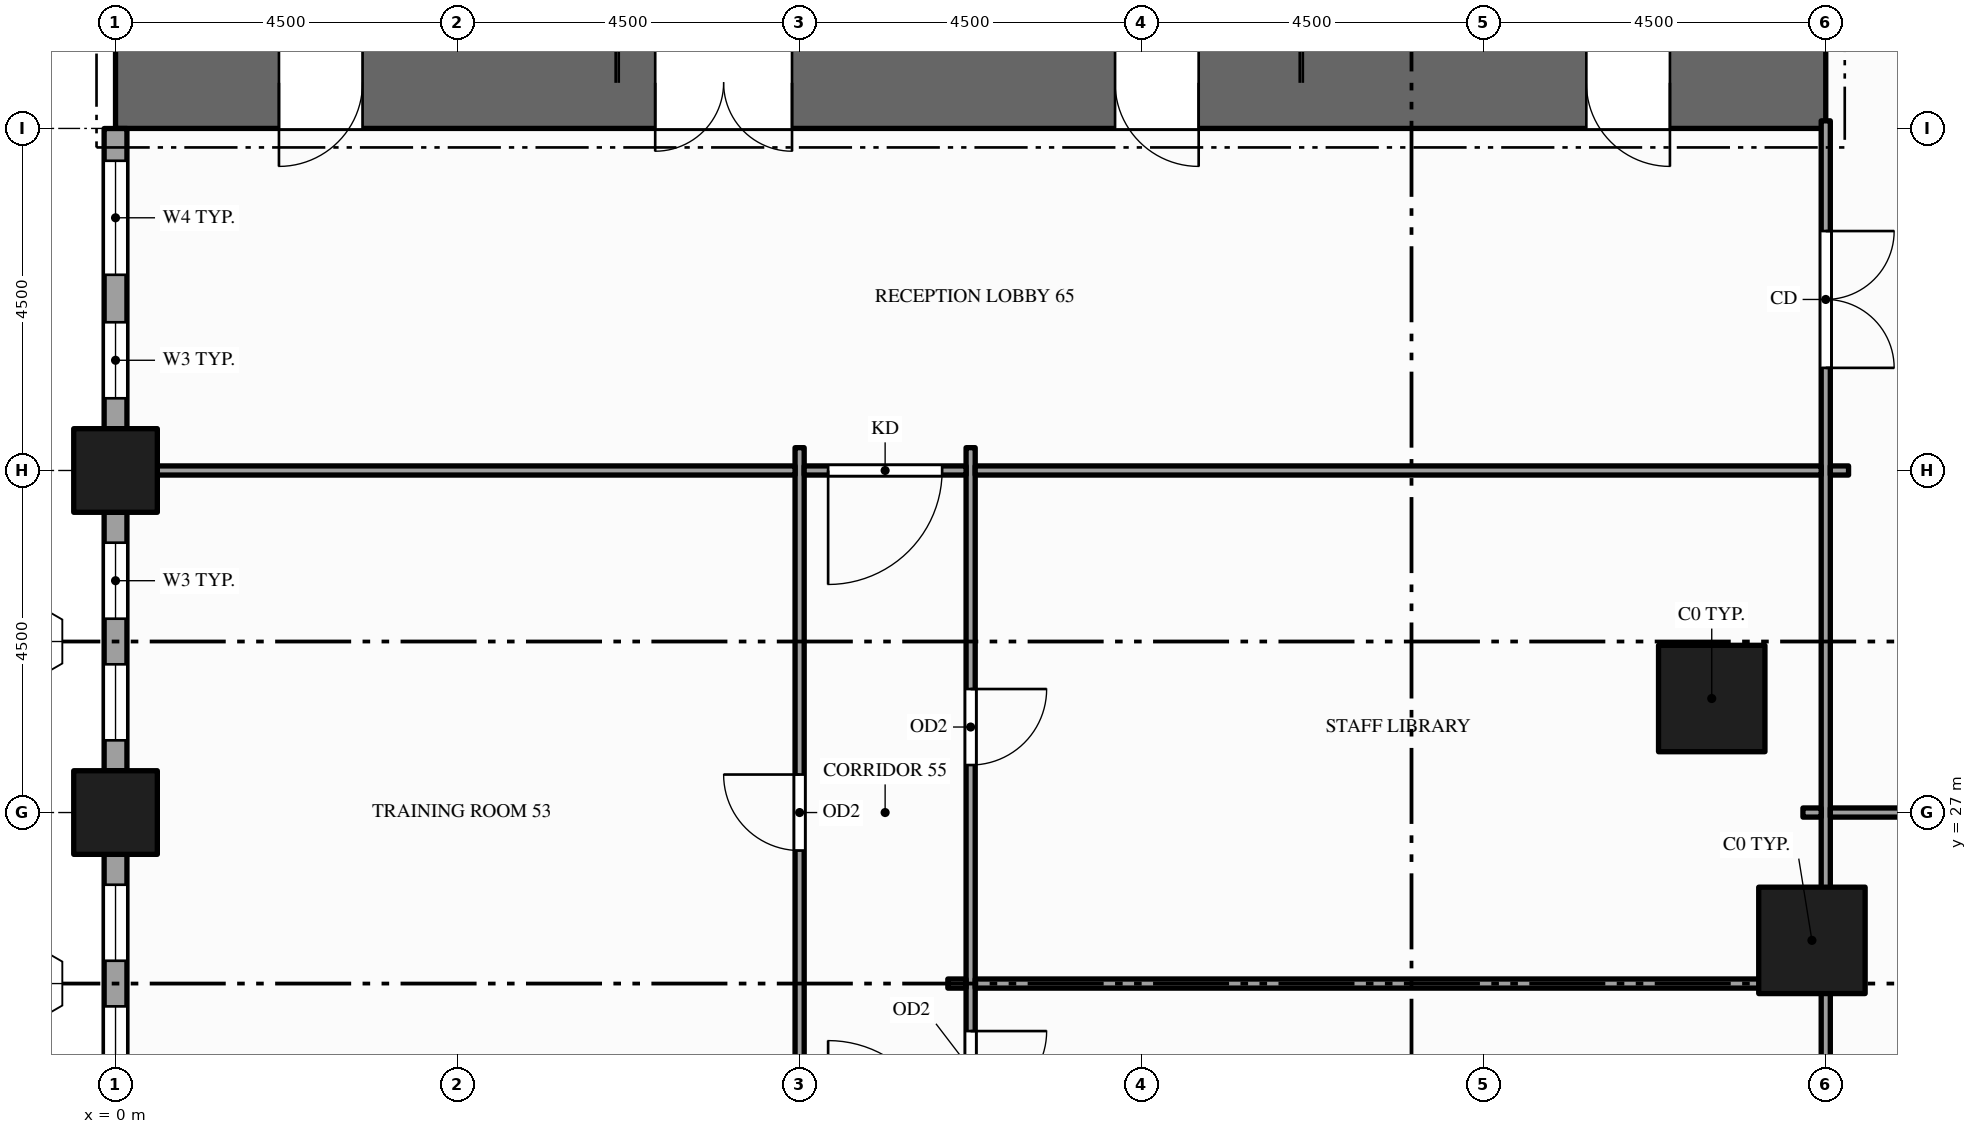
"""IFC4 building model, lengths in metres.
Left out: names, types, materials, properties, quantities, classifications, styles, units other than length and angle.
Written with IfcOpenShell. Run it as: python <this file> out.ifc"""

import sys

from ifc_helpers import new_model, si_unit, direction, frame, frame_2d, origin, origin_2d, place, context, subcontext, project, spatial, rectangle, hollow_rectangle, extrude, element, fill, save


model = new_model("IFC4")
c1 = context("Model", 3, precision=1e-05, world=origin(), true_north=direction((0.0, 1.0)))
c2 = subcontext(c1, "Body", "Model", "MODEL_VIEW")
j1 = project(units=[si_unit("LENGTHUNIT", "METRE"), si_unit("PLANEANGLEUNIT", "RADIAN")], contexts=[c1])
p1 = place(None, origin())
s1 = spatial("IfcSite", under=j1, at=p1, CompositionType="ELEMENT")
p2 = place(p1, origin())
s2 = spatial("IfcBuilding", under=s1, at=p2, CompositionType="ELEMENT")
p3 = place(p2, frame((0.0, 0.0, 19.0)))
s3 = spatial("IfcBuildingStorey", under=s2, at=p3, CompositionType="ELEMENT", Elevation=19.0)
p4 = place(p3, frame((0.0, 36.6, -0.15), z_axis=(0.0, 0.0, 1.0), x_axis=(1.0, 0.0, 0.0)))
e1 = element("IfcWall", 1, at=p4, inside=s3, PredefinedType="SHEAR", context=c2, shape_type="SweptSolid", body=[
    extrude(rectangle(XDim=22.5, YDim=1.2, at=frame_2d((11.25, 0.0))), origin(), (0.0, 0.0, 1.0), 5.0),
])
p5 = place(p4, frame((7.1, 0.0, 0.15)))
e2 = element("IfcOpeningElement", 2, at=p5, cuts=e1, PredefinedType="OPENING", context=c2, shape_type="SweptSolid", body=[
    extrude(rectangle(XDim=1.8, YDim=2.1, at=frame_2d((0.9, 1.05))), frame((0.0, 0.61, 0.0), z_axis=(0.0, -1.0, 0.0), x_axis=(1.0, 0.0, 0.0)), (0.0, 0.0, 1.0), 1.22),
])
p6 = place(p4, frame((13.15, 0.0, 0.15)))
e3 = element("IfcOpeningElement", 3, at=p6, cuts=e1, PredefinedType="OPENING", context=c2, shape_type="SweptSolid", body=[
    extrude(rectangle(XDim=1.1, YDim=2.1, at=frame_2d((0.55, 1.05))), frame((0.0, 0.61, 0.0), z_axis=(0.0, -1.0, 0.0), x_axis=(1.0, 0.0, 0.0)), (0.0, 0.0, 1.0), 1.22),
])
p7 = place(p4, frame((2.15, 0.0, 0.15)))
e4 = element("IfcOpeningElement", 4, at=p7, cuts=e1, PredefinedType="OPENING", context=c2, shape_type="SweptSolid", body=[
    extrude(rectangle(XDim=1.1, YDim=2.1, at=frame_2d((0.55, 1.05))), frame((0.0, 0.61, 0.0), z_axis=(0.0, -1.0, 0.0), x_axis=(1.0, 0.0, 0.0)), (0.0, 0.0, 1.0), 1.22),
])
p8 = place(p4, frame((19.35, 0.0, 0.15)))
e5 = element("IfcOpeningElement", 5, at=p8, cuts=e1, PredefinedType="OPENING", context=c2, shape_type="SweptSolid", body=[
    extrude(rectangle(XDim=1.1, YDim=2.1, at=frame_2d((0.55, 1.05))), frame((0.0, 0.61, 0.0), z_axis=(0.0, -1.0, 0.0), x_axis=(1.0, 0.0, 0.0)), (0.0, 0.0, 1.0), 1.22),
])
for number, where, z_axis, x_axis in (
    (6, (0.0, 27.0, -0.25), (0.0, 0.0, 1.0), (1.0, 0.0, 0.0)),
    (7, (0.0, 31.5, -0.25), (0.0, 0.0, 1.0), (1.0, 0.0, 0.0)),
):
    element("IfcColumn", number, at=place(p3, frame(where, z_axis=z_axis, x_axis=x_axis)), inside=s3, PredefinedType="COLUMN", context=c2, shape_type="SweptSolid", body=[
        extrude(hollow_rectangle(XDim=1.1, YDim=1.1, WallThickness=0.06, at=origin_2d()), origin(), (0.0, 0.0, 1.0), 5.0),
    ])
for number, where, z_axis, x_axis in (
    (8, (21.0, 28.5, -0.25), (0.0, 0.0, 1.0), (1.0, 0.0, 0.0)),
    (9, (22.318, 25.318, -0.25), (0.0, 0.0, 1.0), (1.0, 0.0, 0.0)),
):
    element("IfcColumn", number, at=place(p3, frame(where, z_axis=z_axis, x_axis=x_axis)), inside=s3, PredefinedType="COLUMN", context=c2, shape_type="SweptSolid", body=[
        extrude(hollow_rectangle(XDim=1.4, YDim=1.4, WallThickness=0.08, at=origin_2d()), origin(), (0.0, 0.0, 1.0), 5.0),
    ])
p9 = place(p3, frame((0.0, 35.999, 0.0), z_axis=(0.0, 0.0, 1.0), x_axis=(0.0, -1.0, 0.0)))
e10 = element("IfcWall", 10, at=p9, inside=s3, PredefinedType="STANDARD", context=c2, shape_type="SweptSolid", body=[
    extrude(rectangle(XDim=3.949, YDim=0.3, at=frame_2d((1.975, 0.0))), origin(), (0.0, 0.0, 1.0), 4.036),
])
p10 = place(p9, frame((0.425, 0.0, 0.9)))
e11 = element("IfcOpeningElement", 11, at=p10, cuts=e10, PredefinedType="OPENING", context=c2, shape_type="SweptSolid", body=[
    extrude(rectangle(XDim=1.5, YDim=2.75, at=frame_2d((0.75, 1.375))), frame((0.0, 0.16, 0.0), z_axis=(0.0, -1.0, 0.0), x_axis=(1.0, 0.0, 0.0)), (0.0, 0.0, 1.0), 0.32),
])
p11 = place(p9, frame((2.549, 0.0, 0.9)))
e12 = element("IfcOpeningElement", 12, at=p11, cuts=e10, PredefinedType="OPENING", context=c2, shape_type="SweptSolid", body=[
    extrude(rectangle(XDim=1.0, YDim=2.75, at=frame_2d((0.5, 1.375))), frame((0.0, 0.16, 0.0), z_axis=(0.0, -1.0, 0.0), x_axis=(1.0, 0.0, 0.0)), (0.0, 0.0, 1.0), 0.32),
])
p12 = place(p3, frame((0.0, 30.95, 0.0), z_axis=(0.0, 0.0, 1.0), x_axis=(0.0, -1.0, 0.0)))
e13 = element("IfcWall", 13, at=p12, inside=s3, PredefinedType="STANDARD", context=c2, shape_type="SweptSolid", body=[
    extrude(rectangle(XDim=3.4, YDim=0.3, at=frame_2d((1.7, 0.0))), origin(), (0.0, 0.0, 1.0), 4.036),
])
p13 = place(p12, frame((0.4, 0.0, 0.9)))
e14 = element("IfcOpeningElement", 14, at=p13, cuts=e13, PredefinedType="OPENING", context=c2, shape_type="SweptSolid", body=[
    extrude(rectangle(XDim=1.0, YDim=2.75, at=frame_2d((0.5, 1.375))), frame((0.0, 0.16, 0.0), z_axis=(0.0, -1.0, 0.0), x_axis=(1.0, 0.0, 0.0)), (0.0, 0.0, 1.0), 0.32),
])
p14 = place(p12, frame((2.0, 0.0, 0.9)))
e15 = element("IfcOpeningElement", 15, at=p14, cuts=e13, PredefinedType="OPENING", context=c2, shape_type="SweptSolid", body=[
    extrude(rectangle(XDim=1.0, YDim=2.75, at=frame_2d((0.5, 1.375))), frame((0.0, 0.16, 0.0), z_axis=(0.0, -1.0, 0.0), x_axis=(1.0, 0.0, 0.0)), (0.0, 0.0, 1.0), 0.32),
])
p15 = place(p3, frame((0.0, 26.45, 0.0), z_axis=(0.0, 0.0, 1.0), x_axis=(0.0, -1.0, 0.0)))
e16 = element("IfcWall", 16, at=p15, inside=s3, PredefinedType="STANDARD", context=c2, shape_type="SweptSolid", body=[
    extrude(rectangle(XDim=3.4, YDim=0.3, at=frame_2d((1.7, 0.0))), origin(), (0.0, 0.0, 1.0), 4.036),
])
p16 = place(p15, frame((0.4, 0.0, 0.9)))
e17 = element("IfcOpeningElement", 17, at=p16, cuts=e16, PredefinedType="OPENING", context=c2, shape_type="SweptSolid", body=[
    extrude(rectangle(XDim=1.0, YDim=2.75, at=frame_2d((0.5, 1.375))), frame((0.0, 0.16, 0.0), z_axis=(0.0, -1.0, 0.0), x_axis=(1.0, 0.0, 0.0)), (0.0, 0.0, 1.0), 0.32),
])
p17 = place(p15, frame((2.0, 0.0, 0.9)))
e18 = element("IfcOpeningElement", 18, at=p17, cuts=e16, PredefinedType="OPENING", context=c2, shape_type="SweptSolid", body=[
    extrude(rectangle(XDim=1.0, YDim=2.75, at=frame_2d((0.5, 1.375))), frame((0.0, 0.16, 0.0), z_axis=(0.0, -1.0, 0.0), x_axis=(1.0, 0.0, 0.0)), (0.0, 0.0, 1.0), 0.32),
])
p18 = place(p3, frame((9.0, 10.95, 0.0), z_axis=(0.0, 0.0, 1.0), x_axis=(0.0, 1.0, 0.0)))
e19 = element("IfcWall", 19, at=p18, inside=s3, PredefinedType="PARTITIONING", context=c2, shape_type="SweptSolid", body=[
    extrude(rectangle(XDim=20.85, YDim=0.12, at=frame_2d((10.425, 0.0))), origin(), (0.0, 0.0, 1.0), 3.5),
])
p19 = place(p18, frame((15.55, 0.0, 0.0)))
e20 = element("IfcOpeningElement", 20, at=p19, cuts=e19, PredefinedType="OPENING", context=c2, shape_type="SweptSolid", body=[
    extrude(rectangle(XDim=1.0, YDim=2.1, at=frame_2d((0.5, 1.05))), frame((0.0, 0.07, 0.0), z_axis=(0.0, -1.0, 0.0), x_axis=(1.0, 0.0, 0.0)), (0.0, 0.0, 1.0), 0.14),
])
p20 = place(p3, frame((11.25, 10.95, 0.0), z_axis=(0.0, 0.0, 1.0), x_axis=(0.0, 1.0, 0.0)))
e21 = element("IfcWall", 21, at=p20, inside=s3, PredefinedType="PARTITIONING", context=c2, shape_type="SweptSolid", body=[
    extrude(rectangle(XDim=20.85, YDim=0.12, at=frame_2d((10.425, 0.0))), origin(), (0.0, 0.0, 1.0), 3.5),
])
p21 = place(p20, frame((5.425, 0.0, 0.0)))
e22 = element("IfcOpeningElement", 22, at=p21, cuts=e21, PredefinedType="OPENING", context=c2, shape_type="SweptSolid", body=[
    extrude(rectangle(XDim=1.0, YDim=2.1, at=frame_2d((0.5, 1.05))), frame((0.0, 0.07, 0.0), z_axis=(0.0, -1.0, 0.0), x_axis=(1.0, 0.0, 0.0)), (0.0, 0.0, 1.0), 0.14),
])
p22 = place(p20, frame((12.175, 0.0, 0.0)))
e23 = element("IfcOpeningElement", 23, at=p22, cuts=e21, PredefinedType="OPENING", context=c2, shape_type="SweptSolid", body=[
    extrude(rectangle(XDim=1.0, YDim=2.1, at=frame_2d((0.5, 1.05))), frame((0.0, 0.07, 0.0), z_axis=(0.0, -1.0, 0.0), x_axis=(1.0, 0.0, 0.0)), (0.0, 0.0, 1.0), 0.14),
])
p23 = place(p20, frame((16.675, 0.0, 0.0)))
e24 = element("IfcOpeningElement", 24, at=p23, cuts=e21, PredefinedType="OPENING", context=c2, shape_type="SweptSolid", body=[
    extrude(rectangle(XDim=1.0, YDim=2.1, at=frame_2d((0.5, 1.05))), frame((0.0, 0.07, 0.0), z_axis=(0.0, -1.0, 0.0), x_axis=(1.0, 0.0, 0.0)), (0.0, 0.0, 1.0), 0.14),
])
p24 = place(p3, frame((22.5, 0.15, 0.0), z_axis=(0.0, 0.0, 1.0), x_axis=(0.0, 1.0, 0.0)))
e25 = element("IfcWall", 25, at=p24, inside=s3, PredefinedType="PARTITIONING", context=c2, shape_type="SweptSolid", body=[
    extrude(rectangle(XDim=35.95, YDim=0.12, at=frame_2d((17.975, 0.0))), origin(), (0.0, 0.0, 1.0), 3.759),
])
p25 = place(p24, frame((9.225, 0.0, 0.0)))
e26 = element("IfcOpeningElement", 26, at=p25, cuts=e25, PredefinedType="OPENING", context=c2, shape_type="SweptSolid", body=[
    extrude(rectangle(XDim=1.5, YDim=2.1, at=frame_2d((0.75, 1.05))), frame((0.0, 0.07, 0.0), z_axis=(0.0, -1.0, 0.0), x_axis=(1.0, 0.0, 0.0)), (0.0, 0.0, 1.0), 0.14),
])
p26 = place(p24, frame((32.7, 0.0, 0.0)))
e27 = element("IfcOpeningElement", 27, at=p26, cuts=e25, PredefinedType="OPENING", context=c2, shape_type="SweptSolid", body=[
    extrude(rectangle(XDim=1.8, YDim=2.1, at=frame_2d((0.9, 1.05))), frame((0.0, 0.07, 0.0), z_axis=(0.0, -1.0, 0.0), x_axis=(1.0, 0.0, 0.0)), (0.0, 0.0, 1.0), 0.14),
])
p27 = place(p3, frame((10.95, 24.75, 0.0), z_axis=(0.0, 0.0, 1.0), x_axis=(1.0, 0.0, 0.0)))
e28 = element("IfcWall", 28, at=p27, inside=s3, PredefinedType="PARTITIONING", context=c2, shape_type="SweptSolid", body=[
    extrude(rectangle(XDim=0.24, YDim=0.12, at=frame_2d((0.12, 0.0))), origin(), (0.0, 0.0, 1.0), 3.759),
])
p28 = place(p3, frame((11.31, 24.75, 0.0), z_axis=(0.0, 0.0, 1.0), x_axis=(1.0, 0.0, 0.0)))
e29 = element("IfcWall", 29, at=p28, inside=s3, PredefinedType="PARTITIONING", context=c2, shape_type="SweptSolid", body=[
    extrude(rectangle(XDim=11.13, YDim=0.12, at=frame_2d((5.565, 0.0))), origin(), (0.0, 0.0, 1.0), 3.759),
])
p29 = place(p3, frame((22.56, 24.75, 0.0), z_axis=(0.0, 0.0, 1.0), x_axis=(1.0, 0.0, 0.0)))
e30 = element("IfcWall", 30, at=p29, inside=s3, PredefinedType="PARTITIONING", context=c2, shape_type="SweptSolid", body=[
    extrude(rectangle(XDim=0.24, YDim=0.12, at=frame_2d((0.12, 0.0))), origin(), (0.0, 0.0, 1.0), 4.75),
])
p30 = place(p3, frame((22.2, 27.0, 0.0), z_axis=(0.0, 0.0, 1.0), x_axis=(1.0, 0.0, 0.0)))
e31 = element("IfcWall", 31, at=p30, inside=s3, PredefinedType="PARTITIONING", context=c2, shape_type="SweptSolid", body=[
    extrude(rectangle(XDim=0.24, YDim=0.12, at=frame_2d((0.12, 0.0))), origin(), (0.0, 0.0, 1.0), 3.759),
])
p31 = place(p3, frame((22.56, 27.0, 0.0), z_axis=(0.0, 0.0, 1.0), x_axis=(1.0, 0.0, 0.0)))
e32 = element("IfcWall", 32, at=p31, inside=s3, PredefinedType="PARTITIONING", context=c2, shape_type="SweptSolid", body=[
    extrude(rectangle(XDim=4.38, YDim=0.12, at=frame_2d((2.19, 0.0))), origin(), (0.0, 0.0, 1.0), 3.66),
])
p32 = place(p31, frame((1.29, 0.0, 0.0)))
e33 = element("IfcOpeningElement", 33, at=p32, cuts=e32, PredefinedType="OPENING", context=c2, shape_type="SweptSolid", body=[
    extrude(rectangle(XDim=1.8, YDim=2.1, at=frame_2d((0.9, 1.05))), frame((0.0, 0.07, 0.0), z_axis=(0.0, -1.0, 0.0), x_axis=(1.0, 0.0, 0.0)), (0.0, 0.0, 1.0), 0.14),
])
p33 = place(p3, frame((0.15, 31.5, 0.0), z_axis=(0.0, 0.0, 1.0), x_axis=(1.0, 0.0, 0.0)))
e34 = element("IfcWall", 34, at=p33, inside=s3, PredefinedType="PARTITIONING", context=c2, shape_type="SweptSolid", body=[
    extrude(rectangle(XDim=8.79, YDim=0.12, at=frame_2d((4.395, 0.0))), origin(), (0.0, 0.0, 1.0), 3.759),
])
p34 = place(p3, frame((9.06, 31.5, 0.0), z_axis=(0.0, 0.0, 1.0), x_axis=(1.0, 0.0, 0.0)))
e35 = element("IfcWall", 35, at=p34, inside=s3, PredefinedType="PARTITIONING", context=c2, shape_type="SweptSolid", body=[
    extrude(rectangle(XDim=2.13, YDim=0.12, at=frame_2d((1.065, 0.0))), origin(), (0.0, 0.0, 1.0), 3.759),
])
p35 = place(p34, frame((0.315, 0.0, 0.0)))
e36 = element("IfcOpeningElement", 36, at=p35, cuts=e35, PredefinedType="OPENING", context=c2, shape_type="SweptSolid", body=[
    extrude(rectangle(XDim=1.5, YDim=2.1, at=frame_2d((0.75, 1.05))), frame((0.0, 0.07, 0.0), z_axis=(0.0, -1.0, 0.0), x_axis=(1.0, 0.0, 0.0)), (0.0, 0.0, 1.0), 0.14),
])
p36 = place(p3, frame((11.31, 31.5, 0.0), z_axis=(0.0, 0.0, 1.0), x_axis=(1.0, 0.0, 0.0)))
e37 = element("IfcWall", 37, at=p36, inside=s3, PredefinedType="PARTITIONING", context=c2, shape_type="SweptSolid", body=[
    extrude(rectangle(XDim=11.13, YDim=0.12, at=frame_2d((5.565, 0.0))), origin(), (0.0, 0.0, 1.0), 3.5),
])
p37 = place(p3, frame((22.56, 31.5, 0.0), z_axis=(0.0, 0.0, 1.0), x_axis=(1.0, 0.0, 0.0)))
e38 = element("IfcWall", 38, at=p37, inside=s3, PredefinedType="PARTITIONING", context=c2, shape_type="SweptSolid", body=[
    extrude(rectangle(XDim=0.24, YDim=0.12, at=frame_2d((0.12, 0.0))), origin(), (0.0, 0.0, 1.0), 3.759),
])
p38 = place(p10, origin())
e39 = element("IfcWindow", 39, at=p38, inside=s3, PartitioningType="SINGLE_PANEL", PredefinedType="WINDOW", context=c2, shape_type="SweptSolid", body=[
    extrude(rectangle(XDim=1.5, YDim=2.75, at=frame_2d((0.75, 1.375))), frame((0.0, 0.03, 0.0), z_axis=(0.0, -1.0, 0.0), x_axis=(1.0, 0.0, 0.0)), (0.0, 0.0, 1.0), 0.06),
])
fill(e11, e39)
p39 = place(p11, origin())
e40 = element("IfcWindow", 40, at=p39, inside=s3, PartitioningType="SINGLE_PANEL", PredefinedType="WINDOW", context=c2, shape_type="SweptSolid", body=[
    extrude(rectangle(XDim=1.0, YDim=2.75, at=frame_2d((0.5, 1.375))), frame((0.0, 0.03, 0.0), z_axis=(0.0, -1.0, 0.0), x_axis=(1.0, 0.0, 0.0)), (0.0, 0.0, 1.0), 0.06),
])
fill(e12, e40)
p40 = place(p13, origin())
e41 = element("IfcWindow", 41, at=p40, inside=s3, PartitioningType="SINGLE_PANEL", PredefinedType="WINDOW", context=c2, shape_type="SweptSolid", body=[
    extrude(rectangle(XDim=1.0, YDim=2.75, at=frame_2d((0.5, 1.375))), frame((0.0, 0.03, 0.0), z_axis=(0.0, -1.0, 0.0), x_axis=(1.0, 0.0, 0.0)), (0.0, 0.0, 1.0), 0.06),
])
fill(e14, e41)
p41 = place(p14, origin())
e42 = element("IfcWindow", 42, at=p41, inside=s3, PartitioningType="SINGLE_PANEL", PredefinedType="WINDOW", context=c2, shape_type="SweptSolid", body=[
    extrude(rectangle(XDim=1.0, YDim=2.75, at=frame_2d((0.5, 1.375))), frame((0.0, 0.03, 0.0), z_axis=(0.0, -1.0, 0.0), x_axis=(1.0, 0.0, 0.0)), (0.0, 0.0, 1.0), 0.06),
])
fill(e15, e42)
p42 = place(p16, origin())
e43 = element("IfcWindow", 43, at=p42, inside=s3, PartitioningType="SINGLE_PANEL", PredefinedType="WINDOW", context=c2, shape_type="SweptSolid", body=[
    extrude(rectangle(XDim=1.0, YDim=2.75, at=frame_2d((0.5, 1.375))), frame((0.0, 0.03, 0.0), z_axis=(0.0, -1.0, 0.0), x_axis=(1.0, 0.0, 0.0)), (0.0, 0.0, 1.0), 0.06),
])
fill(e17, e43)
p43 = place(p17, origin())
e44 = element("IfcWindow", 44, at=p43, inside=s3, PartitioningType="SINGLE_PANEL", PredefinedType="WINDOW", context=c2, shape_type="SweptSolid", body=[
    extrude(rectangle(XDim=1.0, YDim=2.75, at=frame_2d((0.5, 1.375))), frame((0.0, 0.03, 0.0), z_axis=(0.0, -1.0, 0.0), x_axis=(1.0, 0.0, 0.0)), (0.0, 0.0, 1.0), 0.06),
])
fill(e18, e44)
p44 = place(p5, origin())
e45 = element("IfcDoor", 45, at=p44, inside=s3, OperationType="DOUBLE_DOOR_SINGLE_SWING", PredefinedType="DOOR", context=c2, shape_type="SweptSolid", body=[
    extrude(rectangle(XDim=1.8, YDim=2.1, at=frame_2d((0.9, 1.05))), frame((0.0, 0.025, 0.0), z_axis=(0.0, -1.0, 0.0), x_axis=(1.0, 0.0, 0.0)), (0.0, 0.0, 1.0), 0.05),
])
fill(e2, e45)
p45 = place(p6, origin())
e46 = element("IfcDoor", 46, at=p45, inside=s3, OperationType="SINGLE_SWING_RIGHT", PredefinedType="DOOR", context=c2, shape_type="SweptSolid", body=[
    extrude(rectangle(XDim=1.1, YDim=2.1, at=frame_2d((0.55, 1.05))), frame((0.0, 0.025, 0.0), z_axis=(0.0, -1.0, 0.0), x_axis=(1.0, 0.0, 0.0)), (0.0, 0.0, 1.0), 0.05),
])
fill(e3, e46)
p46 = place(p7, origin())
e47 = element("IfcDoor", 47, at=p46, inside=s3, OperationType="SINGLE_SWING_LEFT", PredefinedType="DOOR", context=c2, shape_type="SweptSolid", body=[
    extrude(rectangle(XDim=1.1, YDim=2.1, at=frame_2d((0.55, 1.05))), frame((0.0, 0.025, 0.0), z_axis=(0.0, -1.0, 0.0), x_axis=(1.0, 0.0, 0.0)), (0.0, 0.0, 1.0), 0.05),
])
fill(e4, e47)
p47 = place(p8, origin())
e48 = element("IfcDoor", 48, at=p47, inside=s3, OperationType="SINGLE_SWING_RIGHT", PredefinedType="DOOR", context=c2, shape_type="SweptSolid", body=[
    extrude(rectangle(XDim=1.1, YDim=2.1, at=frame_2d((0.55, 1.05))), frame((0.0, 0.025, 0.0), z_axis=(0.0, -1.0, 0.0), x_axis=(1.0, 0.0, 0.0)), (0.0, 0.0, 1.0), 0.05),
])
fill(e5, e48)
p48 = place(p35, origin())
e49 = element("IfcDoor", 49, at=p48, inside=s3, OperationType="SINGLE_SWING_LEFT", PredefinedType="DOOR", context=c2, shape_type="SweptSolid", body=[
    extrude(rectangle(XDim=1.5, YDim=2.1, at=frame_2d((0.75, 1.05))), frame((0.0, 0.025, 0.0), z_axis=(0.0, -1.0, 0.0), x_axis=(1.0, 0.0, 0.0)), (0.0, 0.0, 1.0), 0.05),
])
fill(e36, e49)
p49 = place(p19, origin())
e50 = element("IfcDoor", 50, at=p49, inside=s3, OperationType="SINGLE_SWING_RIGHT", PredefinedType="DOOR", context=c2, shape_type="SweptSolid", body=[
    extrude(rectangle(XDim=1.0, YDim=2.1, at=frame_2d((0.5, 1.05))), frame((0.0, 0.025, 0.0), z_axis=(0.0, -1.0, 0.0), x_axis=(1.0, 0.0, 0.0)), (0.0, 0.0, 1.0), 0.05),
])
fill(e20, e50)
p50 = place(p22, origin())
e51 = element("IfcDoor", 51, at=p50, inside=s3, OperationType="SINGLE_SWING_RIGHT", PredefinedType="DOOR", context=c2, shape_type="SweptSolid", body=[
    extrude(rectangle(XDim=1.0, YDim=2.1, at=frame_2d((0.5, 1.05))), frame((0.0, 0.025, 0.0), z_axis=(0.0, -1.0, 0.0), x_axis=(1.0, 0.0, 0.0)), (0.0, 0.0, 1.0), 0.05),
])
fill(e23, e51)
p51 = place(p23, origin())
e52 = element("IfcDoor", 52, at=p51, inside=s3, OperationType="SINGLE_SWING_RIGHT", PredefinedType="DOOR", context=c2, shape_type="SweptSolid", body=[
    extrude(rectangle(XDim=1.0, YDim=2.1, at=frame_2d((0.5, 1.05))), frame((0.0, 0.025, 0.0), z_axis=(0.0, -1.0, 0.0), x_axis=(1.0, 0.0, 0.0)), (0.0, 0.0, 1.0), 0.05),
])
fill(e24, e52)
p52 = place(p26, origin())
e53 = element("IfcDoor", 53, at=p52, inside=s3, OperationType="DOUBLE_DOOR_SINGLE_SWING", PredefinedType="DOOR", context=c2, shape_type="SweptSolid", body=[
    extrude(rectangle(XDim=1.8, YDim=2.1, at=frame_2d((0.9, 1.05))), frame((0.0, 0.025, 0.0), z_axis=(0.0, -1.0, 0.0), x_axis=(1.0, 0.0, 0.0)), (0.0, 0.0, 1.0), 0.05),
])
fill(e27, e53)
save(model, sys.argv[1])
